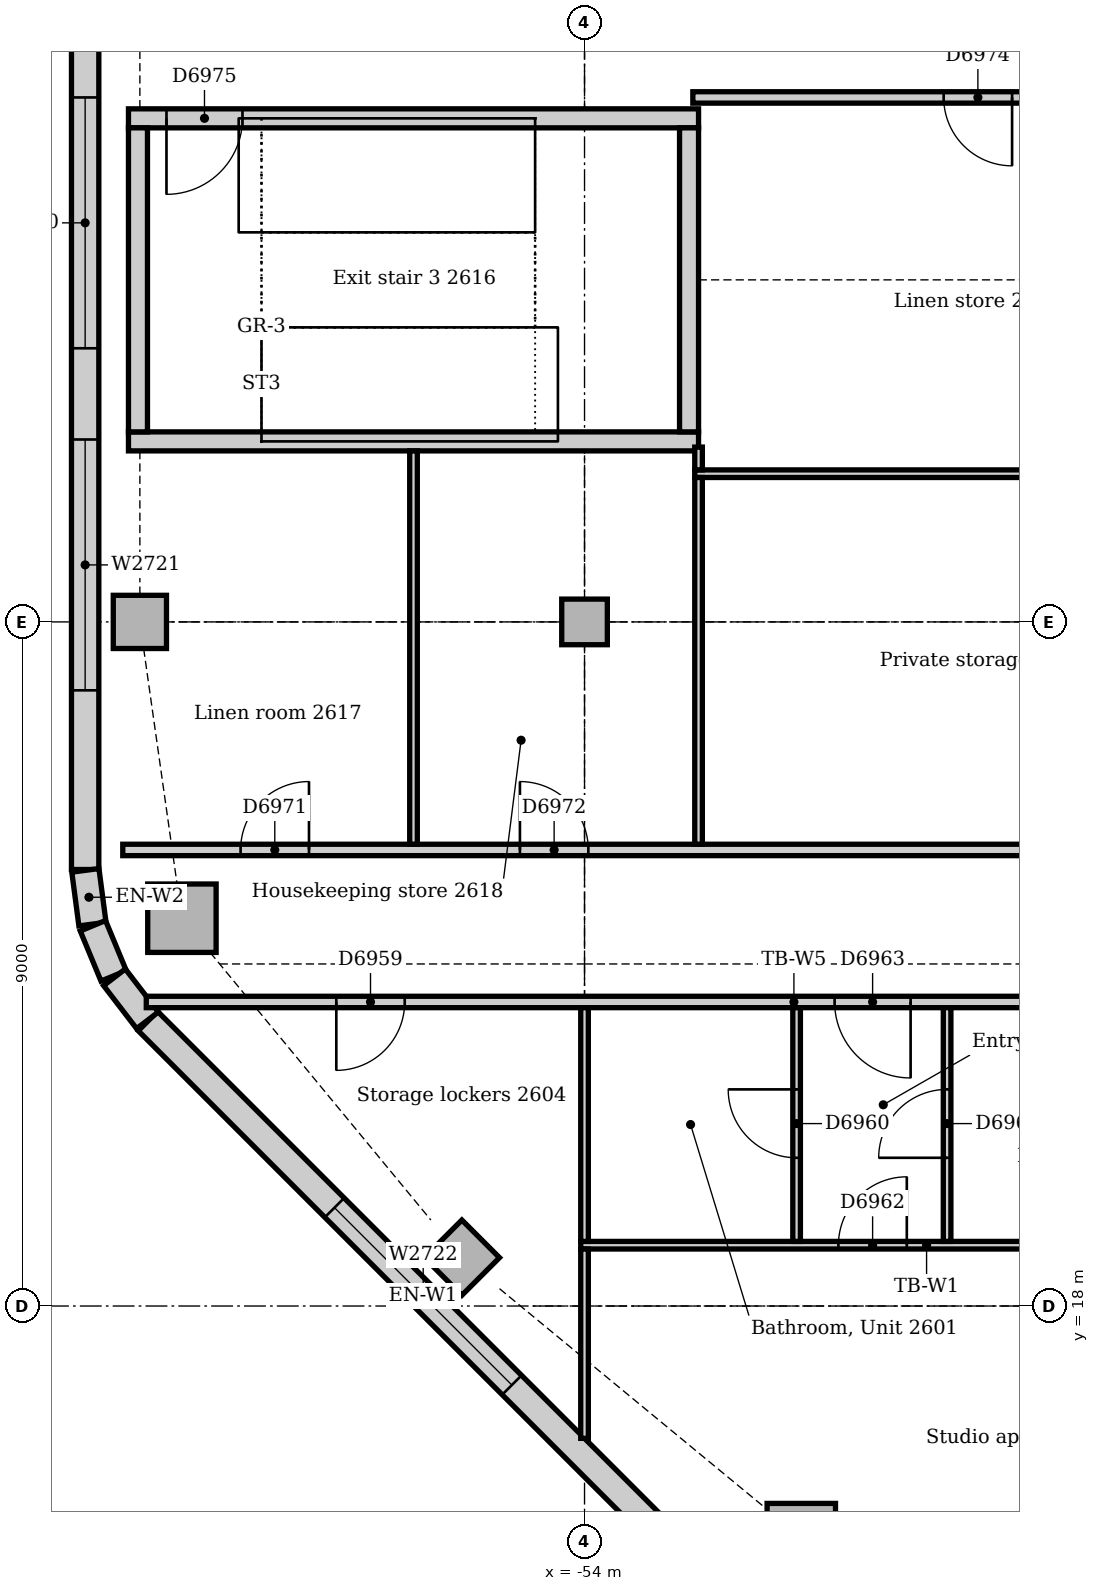
"""IFC4 building model, lengths in metres.
Left out: names, types, materials, properties, quantities, classifications, styles, units other than length and angle.
Written with IfcOpenShell. Run it as: python <this file> out.ifc"""

import sys

from ifc_helpers import new_model, si_unit, direction, frame, frame_2d, origin, origin_2d, place, context, subcontext, project, spatial, rectangle, extrude, element, fill, save


model = new_model("IFC4")
c1 = context("Model", 3, precision=1e-05, world=origin(), true_north=direction((0.0, 1.0)))
c2 = subcontext(c1, "Body", "Model", "MODEL_VIEW")
j1 = project(units=[si_unit("LENGTHUNIT", "METRE"), si_unit("PLANEANGLEUNIT", "RADIAN")], contexts=[c1])
p1 = place(None, origin())
s1 = spatial("IfcSite", under=j1, at=p1, CompositionType="ELEMENT")
p2 = place(p1, origin())
s2 = spatial("IfcBuilding", under=s1, at=p2, CompositionType="ELEMENT")
p3 = place(p2, frame((0.0, 0.0, 112.0)))
s3 = spatial("IfcBuildingStorey", under=s2, at=p3, CompositionType="ELEMENT", Elevation=112.0)
p4 = place(p3, frame((-60.0, 29.375, 0.0), z_axis=(0.0, 0.0, 1.0), x_axis=(1.0, 0.0, 0.0)))
e1 = element("IfcWall", 1, at=p4, inside=s3, PredefinedType="SOLIDWALL", context=c2, shape_type="SweptSolid", body=[
    extrude(rectangle(XDim=7.5, YDim=0.25, at=frame_2d((3.75, 0.0))), origin(), (0.0, 0.0, 1.0), 4.0),
])
p5 = place(p3, frame((-52.5, 33.625, 0.0), z_axis=(0.0, 0.0, 1.0), x_axis=(-1.0, 0.0, 0.0)))
e2 = element("IfcWall", 2, at=p5, inside=s3, PredefinedType="SOLIDWALL", context=c2, shape_type="SweptSolid", body=[
    extrude(rectangle(XDim=7.5, YDim=0.25, at=frame_2d((3.75, 0.0))), origin(), (0.0, 0.0, 1.0), 4.0),
])
p6 = place(p5, frame((6.0, 0.0, 0.0)))
e3 = element("IfcOpeningElement", 3, at=p6, cuts=e2, PredefinedType="OPENING", context=c2, shape_type="SweptSolid", body=[
    extrude(rectangle(XDim=1.0, YDim=2.1, at=frame_2d((0.5, 1.05))), frame((0.0, 0.135, 0.0), z_axis=(0.0, -1.0, 0.0), x_axis=(1.0, 0.0, 0.0)), (0.0, 0.0, 1.0), 0.27),
])
for number, where, z_axis, x_axis in (
    (4, (-52.625, 29.5, 0.0), (0.0, 0.0, 1.0), (0.0, 1.0, 0.0)),
    (5, (-59.875, 33.5, 0.0), (0.0, 0.0, 1.0), (0.0, -1.0, 0.0)),
):
    element("IfcWall", number, at=place(p3, frame(where, z_axis=z_axis, x_axis=x_axis)), inside=s3, PredefinedType="SOLIDWALL", context=c2, shape_type="SweptSolid", body=[
        extrude(rectangle(XDim=4.0, YDim=0.25, at=frame_2d((2.0, 0.0))), origin(), (0.0, 0.0, 1.0), 4.0),
    ])
for number, where, z_axis, x_axis in (
    (6, (-51.148, 14.953, 0.0), (0.0, 0.0, 1.0), (1.0, 0.0, 0.0)),
    (7, (-59.297, 23.102, 0.0), (0.0, 0.0, 1.0), (1.0, 0.0, 0.0)),
):
    element("IfcColumn", number, at=place(p3, frame(where, z_axis=z_axis, x_axis=x_axis)), inside=s3, PredefinedType="COLUMN", context=c2, shape_type="SweptSolid", body=[
        extrude(rectangle(XDim=0.9, YDim=0.9, at=origin_2d()), origin(), (0.0, 0.0, 1.0), 3.85),
    ])
for number, where, z_axis, x_axis in (
    (8, (-59.85, 27.0, 0.0), (0.0, 0.0, 1.0), (1.0, 0.0, 0.0)),
    (9, (-55.614, 18.636, 0.0), (0.0, 0.0, 1.0), (0.707, 0.707, 0.0)),
):
    element("IfcColumn", number, at=place(p3, frame(where, z_axis=z_axis, x_axis=x_axis)), inside=s3, PredefinedType="COLUMN", context=c2, shape_type="SweptSolid", body=[
        extrude(rectangle(XDim=0.7, YDim=0.7, at=origin_2d()), origin(), (0.0, 0.0, 1.0), 3.85),
    ])
p7 = place(p3, frame((-54.0, 27.0, 0.0), z_axis=(0.0, 0.0, 1.0), x_axis=(1.0, 0.0, 0.0)))
e10 = element("IfcColumn", 10, at=p7, inside=s3, PredefinedType="COLUMN", context=c2, shape_type="SweptSolid", body=[
    extrude(rectangle(XDim=0.6, YDim=0.6, at=origin_2d()), origin(), (0.0, 0.0, 1.0), 3.85),
])
p8 = place(p3, frame((-60.57, 45.257, 0.0), z_axis=(0.0, 0.0, 1.0), x_axis=(0.0, -1.0, 0.0)))
e11 = element("IfcWall", 11, at=p8, inside=s3, PredefinedType="STANDARD", context=c2, shape_type="SweptSolid", body=[
    extrude(rectangle(XDim=21.515, YDim=0.36, at=frame_2d((10.757, 0.0))), origin(), (0.0, 0.0, 1.0), 3.85),
])
p9 = place(p8, frame((2.457, 0.0, 0.9)))
e12 = element("IfcOpeningElement", 12, at=p9, cuts=e11, PredefinedType="OPENING", context=c2, shape_type="SweptSolid", body=[
    extrude(rectangle(XDim=3.3, YDim=1.6, at=frame_2d((1.65, 0.8))), frame((0.0, 0.19, 0.0), z_axis=(0.0, -1.0, 0.0), x_axis=(1.0, 0.0, 0.0)), (0.0, 0.0, 1.0), 0.38),
])
p10 = place(p8, frame((6.857, 0.0, 0.9)))
e13 = element("IfcOpeningElement", 13, at=p10, cuts=e11, PredefinedType="OPENING", context=c2, shape_type="SweptSolid", body=[
    extrude(rectangle(XDim=3.3, YDim=1.6, at=frame_2d((1.65, 0.8))), frame((0.0, 0.19, 0.0), z_axis=(0.0, -1.0, 0.0), x_axis=(1.0, 0.0, 0.0)), (0.0, 0.0, 1.0), 0.38),
])
p11 = place(p8, frame((11.357, 0.0, 0.9)))
e14 = element("IfcOpeningElement", 14, at=p11, cuts=e11, PredefinedType="OPENING", context=c2, shape_type="SweptSolid", body=[
    extrude(rectangle(XDim=3.3, YDim=1.6, at=frame_2d((1.65, 0.8))), frame((0.0, 0.19, 0.0), z_axis=(0.0, -1.0, 0.0), x_axis=(1.0, 0.0, 0.0)), (0.0, 0.0, 1.0), 0.38),
])
p12 = place(p8, frame((15.857, 0.0, 0.9)))
e15 = element("IfcOpeningElement", 15, at=p12, cuts=e11, PredefinedType="OPENING", context=c2, shape_type="SweptSolid", body=[
    extrude(rectangle(XDim=3.3, YDim=1.6, at=frame_2d((1.65, 0.8))), frame((0.0, 0.19, 0.0), z_axis=(0.0, -1.0, 0.0), x_axis=(1.0, 0.0, 0.0)), (0.0, 0.0, 1.0), 0.38),
])
p13 = place(p3, frame((-59.744, 21.749, 0.0), z_axis=(0.0, 0.0, 1.0), x_axis=(0.707106781187, -0.707106781187, 0.0)))
e16 = element("IfcWall", 16, at=p13, inside=s3, PredefinedType="STANDARD", context=c2, shape_type="SweptSolid", body=[
    extrude(rectangle(XDim=10.243, YDim=0.36, at=frame_2d((5.121, 0.0))), origin(), (0.0, 0.0, 1.0), 3.85),
])
p14 = place(p13, frame((3.471, 0.0, 0.9)))
e17 = element("IfcOpeningElement", 17, at=p14, cuts=e16, PredefinedType="OPENING", context=c2, shape_type="SweptSolid", body=[
    extrude(rectangle(XDim=3.3, YDim=1.6, at=frame_2d((1.65, 0.8))), frame((0.0, 0.19, 0.0), z_axis=(0.0, -1.0, 0.0), x_axis=(1.0, 0.0, 0.0)), (0.0, 0.0, 1.0), 0.38),
])
for number, where, z_axis, x_axis in (
    (18, (-60.567, 23.731, 0.0), (0.0, 0.0, 1.0), (0.131, -0.991, 0.0)),
    (19, (-60.468, 23.003, 0.0), (0.0, 0.0, 1.0), (0.383, -0.924, 0.0)),
):
    element("IfcWall", number, at=place(p3, frame(where, z_axis=z_axis, x_axis=x_axis)), inside=s3, PredefinedType="STANDARD", context=c2, shape_type="SweptSolid", body=[
        extrude(rectangle(XDim=0.713, YDim=0.36, at=frame_2d((0.356, 0.0))), origin(), (0.0, 0.0, 1.0), 3.85),
    ])
p15 = place(p3, frame((-60.184, 22.325, 0.0), z_axis=(0.0, 0.0, 1.0), x_axis=(0.608802368033, -0.793321924995, 0.0)))
e20 = element("IfcWall", 20, at=p15, inside=s3, PredefinedType="STANDARD", context=c2, shape_type="SweptSolid", body=[
    extrude(rectangle(XDim=0.713, YDim=0.36, at=frame_2d((0.357, 0.0))), origin(), (0.0, 0.0, 1.0), 3.85),
])
p16 = place(p3, frame((-59.766, 22.0, 0.0), z_axis=(0.0, 0.0, 1.0), x_axis=(1.0, 0.0, 0.0)))
e21 = element("IfcWall", 21, at=p16, inside=s3, PredefinedType="PARTITIONING", context=c2, shape_type="SweptSolid", body=[
    extrude(rectangle(XDim=17.041, YDim=0.15, at=frame_2d((8.52, 0.0))), origin(), (0.0, 0.0, 1.0), 3.85),
])
p17 = place(p16, frame((15.366, 0.0, 0.0)))
e22 = element("IfcOpeningElement", 22, at=p17, cuts=e21, PredefinedType="OPENING", context=c2, shape_type="SweptSolid", body=[
    extrude(rectangle(XDim=0.9, YDim=2.1, at=frame_2d((0.45, 1.05))), frame((0.0, 0.085, 0.0), z_axis=(0.0, -1.0, 0.0), x_axis=(1.0, 0.0, 0.0)), (0.0, 0.0, 1.0), 0.17),
])
p18 = place(p16, frame((2.5, 0.0, 0.0)))
e23 = element("IfcOpeningElement", 23, at=p18, cuts=e21, PredefinedType="OPENING", context=c2, shape_type="SweptSolid", body=[
    extrude(rectangle(XDim=0.9, YDim=2.1, at=frame_2d((0.45, 1.05))), frame((0.0, 0.085, 0.0), z_axis=(0.0, -1.0, 0.0), x_axis=(1.0, 0.0, 0.0)), (0.0, 0.0, 1.0), 0.17),
])
p19 = place(p16, frame((9.056, 0.0, 0.0)))
e24 = element("IfcOpeningElement", 24, at=p19, cuts=e21, PredefinedType="OPENING", context=c2, shape_type="SweptSolid", body=[
    extrude(rectangle(XDim=1.0, YDim=2.1, at=frame_2d((0.5, 1.05))), frame((0.0, 0.085, 0.0), z_axis=(0.0, -1.0, 0.0), x_axis=(1.0, 0.0, 0.0)), (0.0, 0.0, 1.0), 0.17),
])
p20 = place(p3, frame((-60.075, 24.0, 0.0), z_axis=(0.0, 0.0, 1.0), x_axis=(1.0, 0.0, 0.0)))
e25 = element("IfcWall", 25, at=p20, inside=s3, PredefinedType="PARTITIONING", context=c2, shape_type="SweptSolid", body=[
    extrude(rectangle(XDim=15.15, YDim=0.15, at=frame_2d((7.575, 0.0))), origin(), (0.0, 0.0, 1.0), 3.85),
])
p21 = place(p20, frame((1.55, 0.0, 0.0)))
e26 = element("IfcOpeningElement", 26, at=p21, cuts=e25, PredefinedType="OPENING", context=c2, shape_type="SweptSolid", body=[
    extrude(rectangle(XDim=0.9, YDim=2.1, at=frame_2d((0.45, 1.05))), frame((0.0, 0.085, 0.0), z_axis=(0.0, -1.0, 0.0), x_axis=(1.0, 0.0, 0.0)), (0.0, 0.0, 1.0), 0.17),
])
p22 = place(p20, frame((5.225, 0.0, 0.0)))
e27 = element("IfcOpeningElement", 27, at=p22, cuts=e25, PredefinedType="OPENING", context=c2, shape_type="SweptSolid", body=[
    extrude(rectangle(XDim=0.9, YDim=2.1, at=frame_2d((0.45, 1.05))), frame((0.0, 0.085, 0.0), z_axis=(0.0, -1.0, 0.0), x_axis=(1.0, 0.0, 0.0)), (0.0, 0.0, 1.0), 0.17),
])
p23 = place(p3, frame((-52.575, 33.9, 0.0), z_axis=(0.0, 0.0, 1.0), x_axis=(1.0, 0.0, 0.0)))
e28 = element("IfcWall", 28, at=p23, inside=s3, PredefinedType="PARTITIONING", context=c2, shape_type="SweptSolid", body=[
    extrude(rectangle(XDim=7.5, YDim=0.15, at=frame_2d((3.75, 0.0))), origin(), (0.0, 0.0, 1.0), 3.85),
])
p24 = place(p23, frame((3.3, 0.0, 0.0)))
e29 = element("IfcOpeningElement", 29, at=p24, cuts=e28, PredefinedType="OPENING", context=c2, shape_type="SweptSolid", body=[
    extrude(rectangle(XDim=0.9, YDim=2.1, at=frame_2d((0.45, 1.05))), frame((0.0, 0.085, 0.0), z_axis=(0.0, -1.0, 0.0), x_axis=(1.0, 0.0, 0.0)), (0.0, 0.0, 1.0), 0.17),
])
p25 = place(p3, frame((-54.05, 18.8, 0.0), z_axis=(0.0, 0.0, 1.0), x_axis=(1.0, 0.0, 0.0)))
e30 = element("IfcWall", 30, at=p25, inside=s3, PredefinedType="PARTITIONING", context=c2, shape_type="SweptSolid", body=[
    extrude(rectangle(XDim=9.1, YDim=0.1, at=frame_2d((4.55, 0.0))), origin(), (0.0, 0.0, 1.0), 3.85),
])
p26 = place(p25, frame((3.39, 0.0, 0.0)))
e31 = element("IfcOpeningElement", 31, at=p26, cuts=e30, PredefinedType="OPENING", context=c2, shape_type="SweptSolid", body=[
    extrude(rectangle(XDim=0.9, YDim=2.1, at=frame_2d((0.45, 1.05))), frame((0.0, 0.06, 0.0), z_axis=(0.0, -1.0, 0.0), x_axis=(1.0, 0.0, 0.0)), (0.0, 0.0, 1.0), 0.12),
])
p27 = place(p3, frame((-52.55, 28.95, 0.0), z_axis=(0.0, 0.0, 1.0), x_axis=(1.0, 0.0, 0.0)))
e32 = element("IfcWall", 32, at=p27, inside=s3, PredefinedType="PARTITIONING", context=c2, shape_type="SweptSolid", body=[
    extrude(rectangle(XDim=7.475, YDim=0.1, at=frame_2d((3.737, 0.0))), origin(), (0.0, 0.0, 1.0), 3.85),
])
p28 = place(p3, frame((-54.0, 18.85, 0.0), z_axis=(0.0, 0.0, 1.0), x_axis=(0.0, 1.0, 0.0)))
e33 = element("IfcWall", 33, at=p28, inside=s3, PredefinedType="PARTITIONING", context=c2, shape_type="SweptSolid", body=[
    extrude(rectangle(XDim=3.075, YDim=0.1, at=frame_2d((1.538, 0.0))), origin(), (0.0, 0.0, 1.0), 3.362),
])
p29 = place(p3, frame((-54.0, 16.259, 0.0), z_axis=(0.0, 0.0, 1.0), x_axis=(0.0, 1.0, 0.0)))
e34 = element("IfcWall", 34, at=p29, inside=s3, PredefinedType="PARTITIONING", context=c2, shape_type="SweptSolid", body=[
    extrude(rectangle(XDim=2.491, YDim=0.1, at=frame_2d((1.245, 0.0))), origin(), (0.0, 0.0, 1.0), 3.362),
])
p30 = place(p3, frame((-56.25, 24.075, 0.0), z_axis=(0.0, 0.0, 1.0), x_axis=(0.0, 1.0, 0.0)))
e35 = element("IfcWall", 35, at=p30, inside=s3, PredefinedType="PARTITIONING", context=c2, shape_type="SweptSolid", body=[
    extrude(rectangle(XDim=5.175, YDim=0.1, at=frame_2d((2.587, 0.0))), origin(), (0.0, 0.0, 1.0), 3.85),
])
p31 = place(p3, frame((-52.5, 29.0, 0.0), z_axis=(0.0, 0.0, 1.0), x_axis=(0.0, 1.0, 0.0)))
e36 = element("IfcWall", 36, at=p31, inside=s3, PredefinedType="PARTITIONING", context=c2, shape_type="SweptSolid", body=[
    extrude(rectangle(XDim=0.3, YDim=0.1, at=frame_2d((0.15, 0.0))), origin(), (0.0, 0.0, 1.0), 3.85),
])
p32 = place(p3, frame((-52.5, 24.075, 0.0), z_axis=(0.0, 0.0, 1.0), x_axis=(0.0, 1.0, 0.0)))
e37 = element("IfcWall", 37, at=p32, inside=s3, PredefinedType="PARTITIONING", context=c2, shape_type="SweptSolid", body=[
    extrude(rectangle(XDim=4.825, YDim=0.1, at=frame_2d((2.413, 0.0))), origin(), (0.0, 0.0, 1.0), 3.85),
])
p33 = place(p3, frame((-51.21, 18.85, 0.0), z_axis=(0.0, 0.0, 1.0), x_axis=(0.0, 1.0, 0.0)))
e38 = element("IfcWall", 38, at=p33, inside=s3, PredefinedType="PARTITIONING", context=c2, shape_type="SweptSolid", body=[
    extrude(rectangle(XDim=3.075, YDim=0.1, at=frame_2d((1.538, 0.0))), origin(), (0.0, 0.0, 1.0), 3.85),
])
p34 = place(p33, frame((1.1, 0.0, 0.0)))
e39 = element("IfcOpeningElement", 39, at=p34, cuts=e38, PredefinedType="OPENING", context=c2, shape_type="SweptSolid", body=[
    extrude(rectangle(XDim=0.9, YDim=2.1, at=frame_2d((0.45, 1.05))), frame((0.0, 0.06, 0.0), z_axis=(0.0, -1.0, 0.0), x_axis=(1.0, 0.0, 0.0)), (0.0, 0.0, 1.0), 0.12),
])
p35 = place(p3, frame((-49.23, 18.85, 0.0), z_axis=(0.0, 0.0, 1.0), x_axis=(0.0, 1.0, 0.0)))
e40 = element("IfcWall", 40, at=p35, inside=s3, PredefinedType="PARTITIONING", context=c2, shape_type="SweptSolid", body=[
    extrude(rectangle(XDim=3.075, YDim=0.1, at=frame_2d((1.538, 0.0))), origin(), (0.0, 0.0, 1.0), 3.85),
])
p36 = place(p35, frame((1.1, 0.0, 0.0)))
e41 = element("IfcOpeningElement", 41, at=p36, cuts=e40, PredefinedType="OPENING", context=c2, shape_type="SweptSolid", body=[
    extrude(rectangle(XDim=0.9, YDim=2.1, at=frame_2d((0.45, 1.05))), frame((0.0, 0.06, 0.0), z_axis=(0.0, -1.0, 0.0), x_axis=(1.0, 0.0, 0.0)), (0.0, 0.0, 1.0), 0.12),
])
p37 = place(p11, origin())
e42 = element("IfcWindow", 42, at=p37, inside=s3, PartitioningType="SINGLE_PANEL", PredefinedType="WINDOW", context=c2, shape_type="SweptSolid", body=[
    extrude(rectangle(XDim=3.3, YDim=1.6, at=frame_2d((1.65, 0.8))), frame((0.0, 0.13, 0.0), z_axis=(0.0, -1.0, 0.0), x_axis=(1.0, 0.0, 0.0)), (0.0, 0.0, 1.0), 0.06),
])
fill(e14, e42)
p38 = place(p12, origin())
e43 = element("IfcWindow", 43, at=p38, inside=s3, PartitioningType="SINGLE_PANEL", PredefinedType="WINDOW", context=c2, shape_type="SweptSolid", body=[
    extrude(rectangle(XDim=3.3, YDim=1.6, at=frame_2d((1.65, 0.8))), frame((0.0, 0.13, 0.0), z_axis=(0.0, -1.0, 0.0), x_axis=(1.0, 0.0, 0.0)), (0.0, 0.0, 1.0), 0.06),
])
fill(e15, e43)
p39 = place(p14, origin())
e44 = element("IfcWindow", 44, at=p39, inside=s3, PartitioningType="SINGLE_PANEL", PredefinedType="WINDOW", context=c2, shape_type="SweptSolid", body=[
    extrude(rectangle(XDim=3.3, YDim=1.6, at=frame_2d((1.65, 0.8))), frame((0.0, 0.13, 0.0), z_axis=(0.0, -1.0, 0.0), x_axis=(1.0, 0.0, 0.0)), (0.0, 0.0, 1.0), 0.06),
])
fill(e17, e44)
p40 = place(p18, frame((0.9, 0.0, 0.0), z_axis=(0.0, 0.0, 1.0), x_axis=(-1.0, 0.0, 0.0)))
e45 = element("IfcDoor", 45, at=p40, inside=s3, OperationType="SINGLE_SWING_RIGHT", PredefinedType="DOOR", context=c2, shape_type="SweptSolid", body=[
    extrude(rectangle(XDim=0.9, YDim=2.1, at=frame_2d((0.45, 1.05))), frame((0.0, 0.025, 0.0), z_axis=(0.0, -1.0, 0.0), x_axis=(1.0, 0.0, 0.0)), (0.0, 0.0, 1.0), 0.05),
])
fill(e23, e45)
p41 = place(p34, origin())
e46 = element("IfcDoor", 46, at=p41, inside=s3, OperationType="SINGLE_SWING_RIGHT", PredefinedType="DOOR", context=c2, shape_type="SweptSolid", body=[
    extrude(rectangle(XDim=0.9, YDim=2.1, at=frame_2d((0.45, 1.05))), frame((0.0, 0.025, 0.0), z_axis=(0.0, -1.0, 0.0), x_axis=(1.0, 0.0, 0.0)), (0.0, 0.0, 1.0), 0.05),
])
fill(e39, e46)
p42 = place(p36, origin())
e47 = element("IfcDoor", 47, at=p42, inside=s3, OperationType="SINGLE_SWING_LEFT", PredefinedType="DOOR", context=c2, shape_type="SweptSolid", body=[
    extrude(rectangle(XDim=0.9, YDim=2.1, at=frame_2d((0.45, 1.05))), frame((0.0, 0.025, 0.0), z_axis=(0.0, -1.0, 0.0), x_axis=(1.0, 0.0, 0.0)), (0.0, 0.0, 1.0), 0.05),
])
fill(e41, e47)
p43 = place(p26, origin())
e48 = element("IfcDoor", 48, at=p43, inside=s3, OperationType="SINGLE_SWING_RIGHT", PredefinedType="DOOR", context=c2, shape_type="SweptSolid", body=[
    extrude(rectangle(XDim=0.9, YDim=2.1, at=frame_2d((0.45, 1.05))), frame((0.0, 0.025, 0.0), z_axis=(0.0, -1.0, 0.0), x_axis=(1.0, 0.0, 0.0)), (0.0, 0.0, 1.0), 0.05),
])
fill(e31, e48)
p44 = place(p19, frame((1.0, 0.0, 0.0), z_axis=(0.0, 0.0, 1.0), x_axis=(-1.0, 0.0, 0.0)))
e49 = element("IfcDoor", 49, at=p44, inside=s3, OperationType="SINGLE_SWING_LEFT", PredefinedType="DOOR", context=c2, shape_type="SweptSolid", body=[
    extrude(rectangle(XDim=1.0, YDim=2.1, at=frame_2d((0.5, 1.05))), frame((0.0, 0.025, 0.0), z_axis=(0.0, -1.0, 0.0), x_axis=(1.0, 0.0, 0.0)), (0.0, 0.0, 1.0), 0.05),
])
fill(e24, e49)
p45 = place(p21, origin())
e50 = element("IfcDoor", 50, at=p45, inside=s3, OperationType="SINGLE_SWING_RIGHT", PredefinedType="DOOR", context=c2, shape_type="SweptSolid", body=[
    extrude(rectangle(XDim=0.9, YDim=2.1, at=frame_2d((0.45, 1.05))), frame((0.0, 0.025, 0.0), z_axis=(0.0, -1.0, 0.0), x_axis=(1.0, 0.0, 0.0)), (0.0, 0.0, 1.0), 0.05),
])
fill(e26, e50)
p46 = place(p22, origin())
e51 = element("IfcDoor", 51, at=p46, inside=s3, OperationType="SINGLE_SWING_LEFT", PredefinedType="DOOR", context=c2, shape_type="SweptSolid", body=[
    extrude(rectangle(XDim=0.9, YDim=2.1, at=frame_2d((0.45, 1.05))), frame((0.0, 0.025, 0.0), z_axis=(0.0, -1.0, 0.0), x_axis=(1.0, 0.0, 0.0)), (0.0, 0.0, 1.0), 0.05),
])
fill(e27, e51)
p47 = place(p24, frame((0.9, 0.0, 0.0), z_axis=(0.0, 0.0, 1.0), x_axis=(-1.0, 0.0, 0.0)))
e52 = element("IfcDoor", 52, at=p47, inside=s3, OperationType="SINGLE_SWING_LEFT", PredefinedType="DOOR", context=c2, shape_type="SweptSolid", body=[
    extrude(rectangle(XDim=0.9, YDim=2.1, at=frame_2d((0.45, 1.05))), frame((0.0, 0.025, 0.0), z_axis=(0.0, -1.0, 0.0), x_axis=(1.0, 0.0, 0.0)), (0.0, 0.0, 1.0), 0.05),
])
fill(e29, e52)
p48 = place(p6, origin())
e53 = element("IfcDoor", 53, at=p48, inside=s3, OperationType="SINGLE_SWING_RIGHT", PredefinedType="DOOR", context=c2, shape_type="SweptSolid", body=[
    extrude(rectangle(XDim=1.0, YDim=2.1, at=frame_2d((0.5, 1.05))), frame((0.0, 0.025, 0.0), z_axis=(0.0, -1.0, 0.0), x_axis=(1.0, 0.0, 0.0)), (0.0, 0.0, 1.0), 0.05),
])
fill(e3, e53)
save(model, sys.argv[1])
